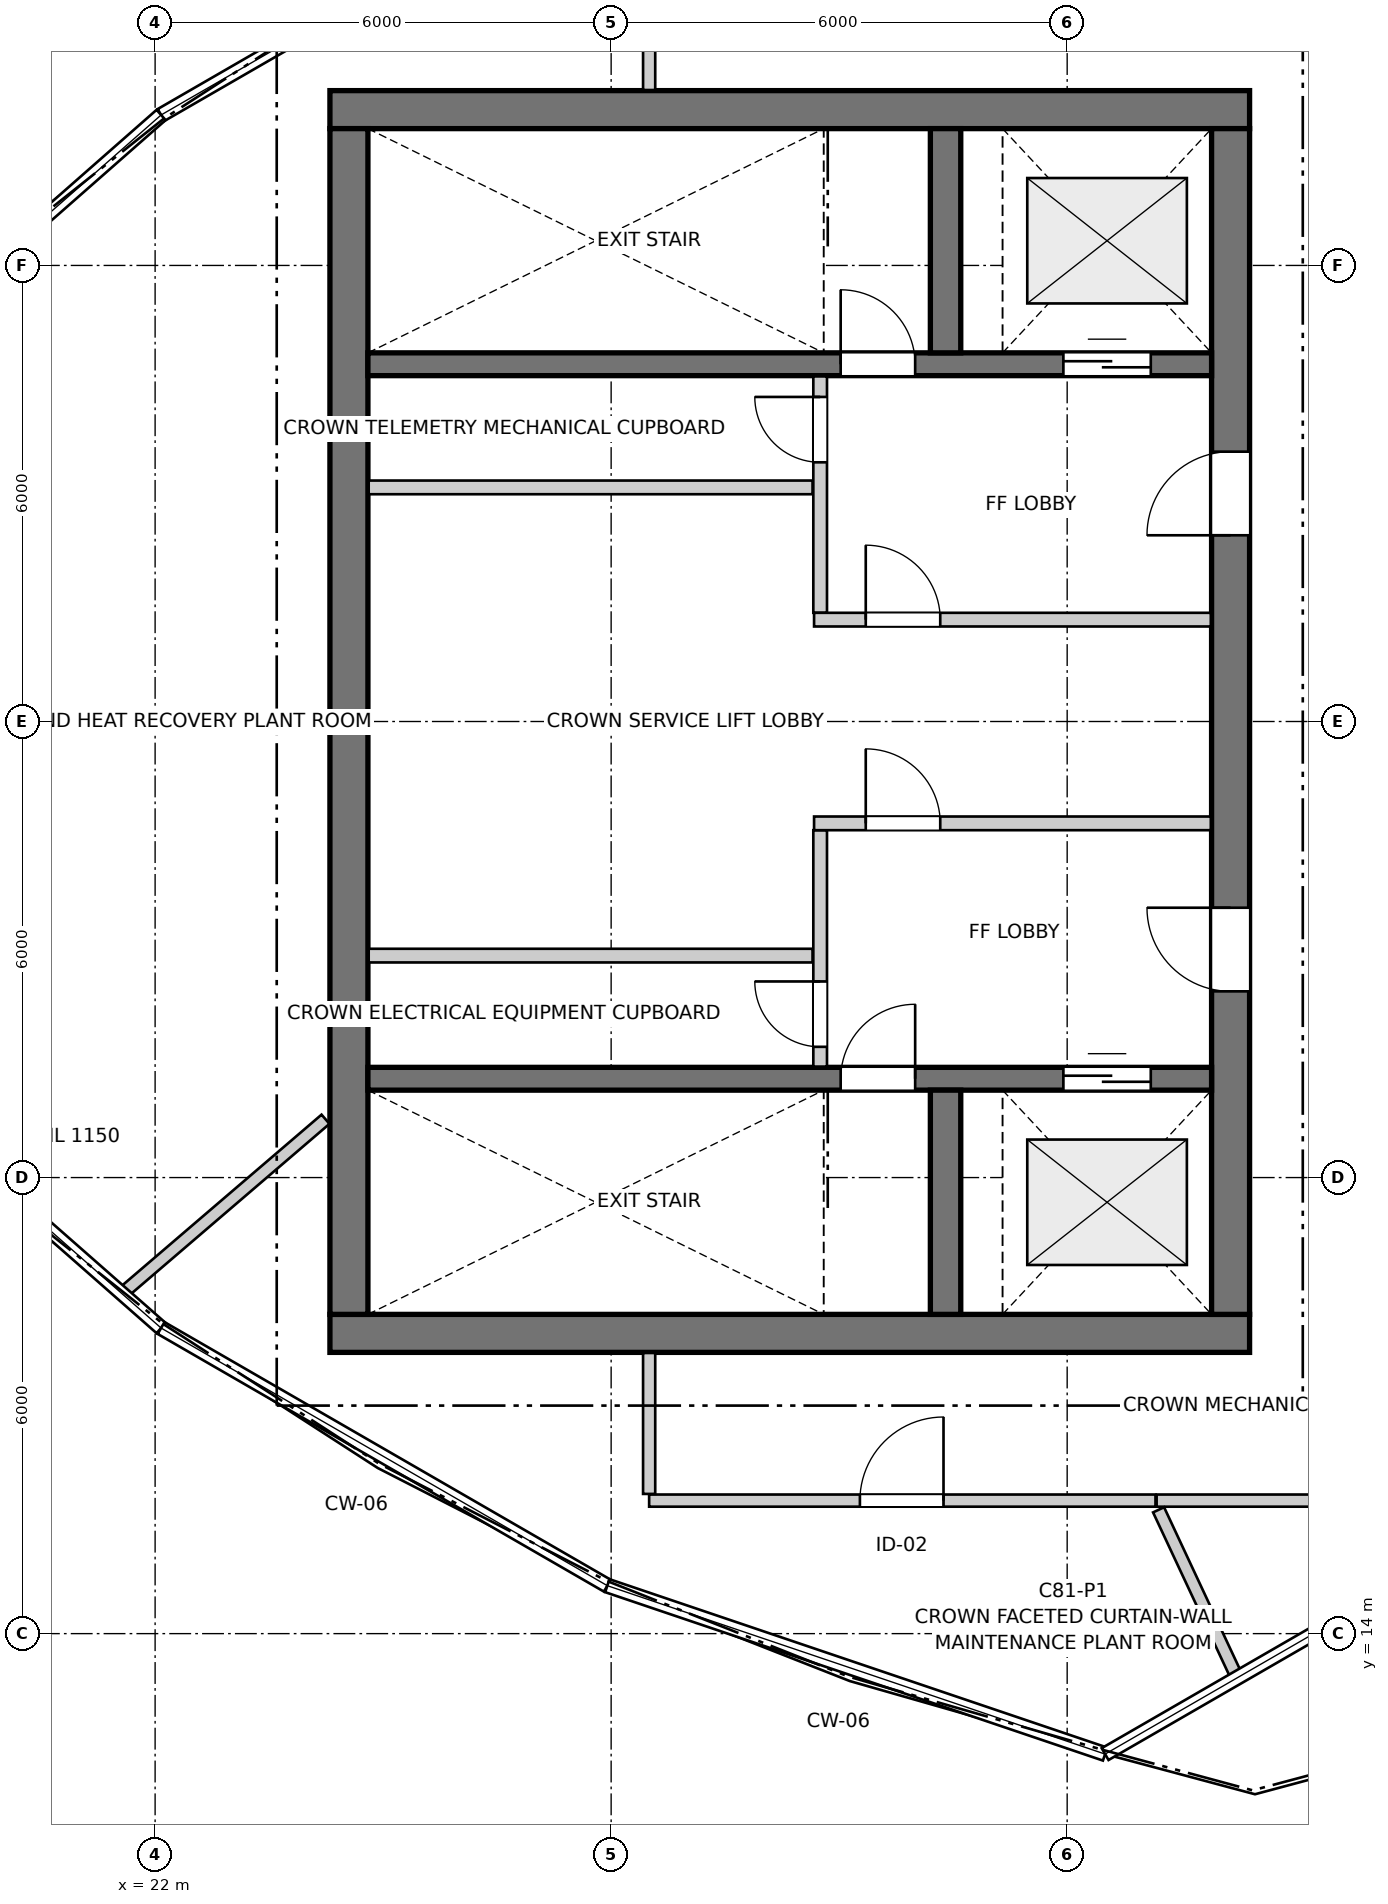
"""IFC4 building model, lengths in metres.
Left out: names, types, materials, properties, quantities, classifications, styles, units other than length and angle.
Written with IfcOpenShell. Run it as: python <this file> out.ifc"""

import sys

from ifc_helpers import new_model, si_unit, direction, frame, frame_2d, origin, place, context, subcontext, project, spatial, rectangle, extrude, source, transform, mapped, element, fill, save


model = new_model("IFC4")
c1 = context("Model", 3, precision=1e-05, world=origin(), true_north=direction((0.0, 1.0)))
c2 = subcontext(c1, "Body", "Model", "MODEL_VIEW")
j1 = project(units=[si_unit("LENGTHUNIT", "METRE"), si_unit("PLANEANGLEUNIT", "RADIAN")], contexts=[c1])
p1 = place(None, origin())
s1 = spatial("IfcSite", under=j1, at=p1, CompositionType="ELEMENT")
p2 = place(p1, origin())
s2 = spatial("IfcBuilding", under=s1, at=p2, CompositionType="ELEMENT")
p3 = place(p2, frame((0.0, 0.0, 274.7)))
s3 = spatial("IfcBuildingStorey", under=s2, at=p3, CompositionType="ELEMENT", Elevation=274.7)
for number, where, z_axis, x_axis in (
    (1, (24.3, 17.95, 0.0), (0.0, 0.0, 1.0), (1.0, 0.0, 0.0)),
    (2, (36.4, 34.05, 0.0), (0.0, 0.0, 1.0), (-1.0, 0.0, 0.0)),
):
    element("IfcWall", number, at=place(p3, frame(where, z_axis=z_axis, x_axis=x_axis)), inside=s3, PredefinedType="SHEAR", context=c2, shape_type="SweptSolid", body=[
        extrude(rectangle(XDim=12.1, YDim=0.5, at=frame_2d((6.05, 0.0))), origin(), (0.0, 0.0, 1.0), 3.062),
    ])
p4 = place(p3, frame((24.55, 33.8, 0.0), z_axis=(0.0, 0.0, 1.0), x_axis=(0.0, -1.0, 0.0)))
e3 = element("IfcWall", 3, at=p4, inside=s3, PredefinedType="SHEAR", context=c2, shape_type="SweptSolid", body=[
    extrude(rectangle(XDim=15.6, YDim=0.5, at=frame_2d((7.8, 0.0))), origin(), (0.0, 0.0, 1.0), 3.062),
])
p5 = place(p3, frame((36.15, 18.2, 0.0), z_axis=(0.0, 0.0, 1.0), x_axis=(0.0, 1.0, 0.0)))
e4 = element("IfcWall", 4, at=p5, inside=s3, PredefinedType="SHEAR", context=c2, shape_type="SweptSolid", body=[
    extrude(rectangle(XDim=15.6, YDim=0.5, at=frame_2d((7.8, 0.0))), origin(), (0.0, 0.0, 1.0), 3.062),
])
p6 = place(p5, frame((4.25, 0.0, 0.0)))
e5 = element("IfcOpeningElement", 5, at=p6, cuts=e4, PredefinedType="OPENING", context=c2, shape_type="SweptSolid", body=[
    extrude(rectangle(XDim=1.1, YDim=2.15, at=frame_2d((0.55, 1.075))), frame((0.0, 0.26, 0.0), z_axis=(0.0, -1.0, 0.0), x_axis=(1.0, 0.0, 0.0)), (0.0, 0.0, 1.0), 0.52),
])
p7 = place(p5, frame((10.25, 0.0, 0.0)))
e6 = element("IfcOpeningElement", 6, at=p7, cuts=e4, PredefinedType="OPENING", context=c2, shape_type="SweptSolid", body=[
    extrude(rectangle(XDim=1.1, YDim=2.15, at=frame_2d((0.55, 1.075))), frame((0.0, 0.26, 0.0), z_axis=(0.0, -1.0, 0.0), x_axis=(1.0, 0.0, 0.0)), (0.0, 0.0, 1.0), 0.52),
])
p8 = place(p3, frame((24.8, 21.3, 0.0), z_axis=(0.0, 0.0, 1.0), x_axis=(1.0, 0.0, 0.0)))
e7 = element("IfcWall", 7, at=p8, inside=s3, PredefinedType="SHEAR", context=c2, shape_type="SweptSolid", body=[
    extrude(rectangle(XDim=11.1, YDim=0.3, at=frame_2d((5.55, 0.0))), origin(), (0.0, 0.0, 1.0), 3.062),
])
p9 = place(p8, frame((6.22, 0.0, 0.0)))
e8 = element("IfcOpeningElement", 8, at=p9, cuts=e7, PredefinedType="OPENING", context=c2, shape_type="SweptSolid", body=[
    extrude(rectangle(XDim=0.98, YDim=2.15, at=frame_2d((0.49, 1.075))), frame((0.0, 0.16, 0.0), z_axis=(0.0, -1.0, 0.0), x_axis=(1.0, 0.0, 0.0)), (0.0, 0.0, 1.0), 0.32),
])
p10 = place(p8, frame((9.15, 0.0, 0.0)))
e9 = element("IfcOpeningElement", 9, at=p10, cuts=e7, PredefinedType="OPENING", context=c2, shape_type="SweptSolid", body=[
    extrude(rectangle(XDim=1.15, YDim=2.15, at=frame_2d((0.575, 1.075))), frame((0.0, 0.16, 0.0), z_axis=(0.0, -1.0, 0.0), x_axis=(1.0, 0.0, 0.0)), (0.0, 0.0, 1.0), 0.32),
])
p11 = place(p3, frame((32.4, 18.2, 0.0), z_axis=(0.0, 0.0, 1.0), x_axis=(0.0, 1.0, 0.0)))
e10 = element("IfcWall", 10, at=p11, inside=s3, PredefinedType="SHEAR", context=c2, shape_type="SweptSolid", body=[
    extrude(rectangle(XDim=2.95, YDim=0.4, at=frame_2d((1.475, 0.0))), origin(), (0.0, 0.0, 1.0), 3.062),
])
p12 = place(p3, frame((24.8, 30.7, 0.0), z_axis=(0.0, 0.0, 1.0), x_axis=(1.0, 0.0, 0.0)))
e11 = element("IfcWall", 11, at=p12, inside=s3, PredefinedType="SHEAR", context=c2, shape_type="SweptSolid", body=[
    extrude(rectangle(XDim=11.1, YDim=0.3, at=frame_2d((5.55, 0.0))), origin(), (0.0, 0.0, 1.0), 3.062),
])
p13 = place(p12, frame((6.22, 0.0, 0.0)))
e12 = element("IfcOpeningElement", 12, at=p13, cuts=e11, PredefinedType="OPENING", context=c2, shape_type="SweptSolid", body=[
    extrude(rectangle(XDim=0.98, YDim=2.15, at=frame_2d((0.49, 1.075))), frame((0.0, 0.16, 0.0), z_axis=(0.0, -1.0, 0.0), x_axis=(1.0, 0.0, 0.0)), (0.0, 0.0, 1.0), 0.32),
])
p14 = place(p12, frame((9.15, 0.0, 0.0)))
e13 = element("IfcOpeningElement", 13, at=p14, cuts=e11, PredefinedType="OPENING", context=c2, shape_type="SweptSolid", body=[
    extrude(rectangle(XDim=1.15, YDim=2.15, at=frame_2d((0.575, 1.075))), frame((0.0, 0.16, 0.0), z_axis=(0.0, -1.0, 0.0), x_axis=(1.0, 0.0, 0.0)), (0.0, 0.0, 1.0), 0.32),
])
p15 = place(p3, frame((32.4, 30.85, 0.0), z_axis=(0.0, 0.0, 1.0), x_axis=(0.0, 1.0, 0.0)))
e14 = element("IfcWall", 14, at=p15, inside=s3, PredefinedType="SHEAR", context=c2, shape_type="SweptSolid", body=[
    extrude(rectangle(XDim=2.95, YDim=0.4, at=frame_2d((1.475, 0.0))), origin(), (0.0, 0.0, 1.0), 3.062),
])
p16 = place(p3, frame((30.75, 21.46, 0.0), z_axis=(0.0, 0.0, 1.0), x_axis=(0.0, 1.0, 0.0)))
e15 = element("IfcWall", 15, at=p16, inside=s3, PredefinedType="PARTITIONING", context=c2, shape_type="SweptSolid", body=[
    extrude(rectangle(XDim=3.11, YDim=0.18, at=frame_2d((1.555, 0.0))), origin(), (0.0, 0.0, 1.0), 2.23),
])
p17 = place(p16, frame((0.26, 0.0, 0.0)))
e16 = element("IfcOpeningElement", 16, at=p17, cuts=e15, PredefinedType="OPENING", context=c2, shape_type="SweptSolid", body=[
    extrude(rectangle(XDim=0.86, YDim=2.05, at=frame_2d((0.43, 1.025))), frame((0.0, 0.1, 0.0), z_axis=(0.0, -1.0, 0.0), x_axis=(1.0, 0.0, 0.0)), (0.0, 0.0, 1.0), 0.2),
])
p18 = place(p3, frame((30.67, 24.66, 0.0), z_axis=(0.0, 0.0, 1.0), x_axis=(1.0, 0.0, 0.0)))
e17 = element("IfcWall", 17, at=p18, inside=s3, PredefinedType="PARTITIONING", context=c2, shape_type="SweptSolid", body=[
    extrude(rectangle(XDim=5.22, YDim=0.18, at=frame_2d((2.61, 0.0))), origin(), (0.0, 0.0, 1.0), 2.23),
])
p19 = place(p18, frame((0.68, 0.0, 0.0)))
e18 = element("IfcOpeningElement", 18, at=p19, cuts=e17, PredefinedType="OPENING", context=c2, shape_type="SweptSolid", body=[
    extrude(rectangle(XDim=0.98, YDim=2.15, at=frame_2d((0.49, 1.075))), frame((0.0, 0.1, 0.0), z_axis=(0.0, -1.0, 0.0), x_axis=(1.0, 0.0, 0.0)), (0.0, 0.0, 1.0), 0.2),
])
p20 = place(p3, frame((30.75, 27.43, 0.0), z_axis=(0.0, 0.0, 1.0), x_axis=(0.0, 1.0, 0.0)))
e19 = element("IfcWall", 19, at=p20, inside=s3, PredefinedType="PARTITIONING", context=c2, shape_type="SweptSolid", body=[
    extrude(rectangle(XDim=3.11, YDim=0.18, at=frame_2d((1.555, 0.0))), origin(), (0.0, 0.0, 1.0), 2.23),
])
p21 = place(p20, frame((1.98, 0.0, 0.0)))
e20 = element("IfcOpeningElement", 20, at=p21, cuts=e19, PredefinedType="OPENING", context=c2, shape_type="SweptSolid", body=[
    extrude(rectangle(XDim=0.86, YDim=2.05, at=frame_2d((0.43, 1.025))), frame((0.0, 0.1, 0.0), z_axis=(0.0, -1.0, 0.0), x_axis=(1.0, 0.0, 0.0)), (0.0, 0.0, 1.0), 0.2),
])
p22 = place(p3, frame((30.67, 27.34, 0.0), z_axis=(0.0, 0.0, 1.0), x_axis=(1.0, 0.0, 0.0)))
e21 = element("IfcWall", 21, at=p22, inside=s3, PredefinedType="PARTITIONING", context=c2, shape_type="SweptSolid", body=[
    extrude(rectangle(XDim=5.22, YDim=0.18, at=frame_2d((2.61, 0.0))), origin(), (0.0, 0.0, 1.0), 2.23),
])
p23 = place(p22, frame((0.68, 0.0, 0.0)))
e22 = element("IfcOpeningElement", 22, at=p23, cuts=e21, PredefinedType="OPENING", context=c2, shape_type="SweptSolid", body=[
    extrude(rectangle(XDim=0.98, YDim=2.15, at=frame_2d((0.49, 1.075))), frame((0.0, 0.1, 0.0), z_axis=(0.0, -1.0, 0.0), x_axis=(1.0, 0.0, 0.0)), (0.0, 0.0, 1.0), 0.2),
])
for number, where, z_axis, x_axis in (
    (23, (24.81, 22.92, 0.0), (0.0, 0.0, 1.0), (1.0, 0.0, 0.0)),
    (24, (24.81, 29.08, 0.0), (0.0, 0.0, 1.0), (1.0, 0.0, 0.0)),
):
    element("IfcWall", number, at=place(p3, frame(where, z_axis=z_axis, x_axis=x_axis)), inside=s3, PredefinedType="PARTITIONING", context=c2, shape_type="SweptSolid", body=[
        extrude(rectangle(XDim=5.84, YDim=0.18, at=frame_2d((2.92, 0.0))), origin(), (0.0, 0.0, 1.0), 2.23),
    ])
p24 = place(p3, frame((28.5, 15.75, 0.0), z_axis=(0.0, 0.0, 1.0), x_axis=(1.0, 0.0, 0.0)))
e25 = element("IfcWall", 25, at=p24, inside=s3, PredefinedType="PARTITIONING", context=c2, shape_type="SweptSolid", body=[
    extrude(rectangle(XDim=6.662, YDim=0.16, at=frame_2d((3.331, 0.0))), origin(), (0.0, 0.0, 1.0), 2.23),
])
p25 = place(p24, frame((2.773, 0.0, 0.0)))
e26 = element("IfcOpeningElement", 26, at=p25, cuts=e25, PredefinedType="OPENING", context=c2, shape_type="SweptSolid", body=[
    extrude(rectangle(XDim=1.1, YDim=2.15, at=frame_2d((0.55, 1.075))), frame((0.0, 0.09, 0.0), z_axis=(0.0, -1.0, 0.0), x_axis=(1.0, 0.0, 0.0)), (0.0, 0.0, 1.0), 0.18),
])
p26 = place(p3, frame((21.585, 18.49, 0.0), z_axis=(0.0, 0.0, 1.0), x_axis=(0.75939941165, 0.650624725619, 0.0)))
e27 = element("IfcWall", 27, at=p26, inside=s3, PredefinedType="PARTITIONING", context=c2, shape_type="SweptSolid", body=[
    extrude(rectangle(XDim=3.499, YDim=0.16, at=frame_2d((1.75, 0.0))), origin(), (0.0, 0.0, 1.0), 2.23),
])
p27 = place(p3, frame((35.177, 15.75, 0.0), z_axis=(0.0, 0.0, 1.0), x_axis=(1.0, 0.0, 0.0)))
e28 = element("IfcWall", 28, at=p27, inside=s3, PredefinedType="PARTITIONING", context=c2, shape_type="SweptSolid", body=[
    extrude(rectangle(XDim=3.385, YDim=0.16, at=frame_2d((1.692, 0.0))), origin(), (0.0, 0.0, 1.0), 2.23),
])
p28 = place(p3, frame((35.203, 15.629, 0.0), z_axis=(0.0, 0.0, 1.0), x_axis=(0.423632901081, -0.905833961122, 0.0)))
e29 = element("IfcWall", 29, at=p28, inside=s3, PredefinedType="PARTITIONING", context=c2, shape_type="SweptSolid", body=[
    extrude(rectangle(XDim=2.414, YDim=0.16, at=frame_2d((1.207, 0.0))), origin(), (0.0, 0.0, 1.0), 2.23),
])
for number, where, z_axis, x_axis in (
    (30, (28.5, 34.308, 0.0), (0.0, 0.0, 1.0), (0.0, 1.0, 0.0)),
    (31, (28.5, 15.838, 0.0), (0.0, 0.0, 1.0), (0.0, 1.0, 0.0)),
):
    element("IfcWall", number, at=place(p3, frame(where, z_axis=z_axis, x_axis=x_axis)), inside=s3, PredefinedType="PARTITIONING", context=c2, shape_type="SweptSolid", body=[
        extrude(rectangle(XDim=1.854, YDim=0.16, at=frame_2d((0.927, 0.0))), origin(), (0.0, 0.0, 1.0), 2.23),
    ])
m1 = source(origin(), c2, "Body", "SweptSolid", [
    extrude(rectangle(XDim=0.98, YDim=2.15, at=frame_2d((0.49, 1.075))), frame((0.0, 0.025, 0.0), z_axis=(0.0, -1.0, 0.0), x_axis=(1.0, 0.0, 0.0)), (0.0, 0.0, 1.0), 0.05),
])
p29 = place(p9, origin())
e32 = element("IfcDoor", 32, at=p29, inside=s3, OperationType="SINGLE_SWING_RIGHT", PredefinedType="DOOR", context=c2, shape_type="MappedRepresentation", body=[
    mapped(m1, transform((0.0, 0.0, 0.0), x_axis=(1.0, 0.0, 0.0), y_axis=(0.0, 1.0, 0.0), z_axis=(0.0, 0.0, 1.0), scale=1.0)),
])
fill(e8, e32)
m2 = source(origin(), c2, "Body", "SweptSolid", [
    extrude(rectangle(XDim=1.15, YDim=2.15, at=frame_2d((0.575, 1.075))), frame((0.0, 0.025, 0.0), z_axis=(0.0, -1.0, 0.0), x_axis=(1.0, 0.0, 0.0)), (0.0, 0.0, 1.0), 0.05),
])
p30 = place(p10, origin())
e33 = element("IfcDoor", 33, at=p30, inside=s3, OperationType="DOUBLE_DOOR_SLIDING", PredefinedType="DOOR", context=c2, shape_type="MappedRepresentation", body=[
    mapped(m2, transform((0.0, 0.0, 0.0), x_axis=(1.0, 0.0, 0.0), y_axis=(0.0, 1.0, 0.0), z_axis=(0.0, 0.0, 1.0), scale=1.0)),
])
fill(e9, e33)
p31 = place(p13, origin())
e34 = element("IfcDoor", 34, at=p31, inside=s3, OperationType="SINGLE_SWING_LEFT", PredefinedType="DOOR", context=c2, shape_type="MappedRepresentation", body=[
    mapped(m1, transform((0.0, 0.0, 0.0), x_axis=(1.0, 0.0, 0.0), y_axis=(0.0, 1.0, 0.0), z_axis=(0.0, 0.0, 1.0), scale=1.0)),
])
fill(e12, e34)
p32 = place(p14, origin())
e35 = element("IfcDoor", 35, at=p32, inside=s3, OperationType="DOUBLE_DOOR_SLIDING", PredefinedType="DOOR", context=c2, shape_type="MappedRepresentation", body=[
    mapped(m2, transform((0.0, 0.0, 0.0), x_axis=(1.0, 0.0, 0.0), y_axis=(0.0, 1.0, 0.0), z_axis=(0.0, 0.0, 1.0), scale=1.0)),
])
fill(e13, e35)
m3 = source(origin(), c2, "Body", "SweptSolid", [
    extrude(rectangle(XDim=1.1, YDim=2.15, at=frame_2d((0.55, 1.075))), frame((0.0, 0.025, 0.0), z_axis=(0.0, -1.0, 0.0), x_axis=(1.0, 0.0, 0.0)), (0.0, 0.0, 1.0), 0.05),
])
p33 = place(p6, origin())
e36 = element("IfcDoor", 36, at=p33, inside=s3, OperationType="SINGLE_SWING_RIGHT", PredefinedType="DOOR", context=c2, shape_type="MappedRepresentation", body=[
    mapped(m3, transform((0.0, 0.0, 0.0), x_axis=(1.0, 0.0, 0.0), y_axis=(0.0, 1.0, 0.0), z_axis=(0.0, 0.0, 1.0), scale=1.0)),
])
fill(e5, e36)
p34 = place(p7, origin())
e37 = element("IfcDoor", 37, at=p34, inside=s3, OperationType="SINGLE_SWING_LEFT", PredefinedType="DOOR", context=c2, shape_type="MappedRepresentation", body=[
    mapped(m3, transform((0.0, 0.0, 0.0), x_axis=(1.0, 0.0, 0.0), y_axis=(0.0, 1.0, 0.0), z_axis=(0.0, 0.0, 1.0), scale=1.0)),
])
fill(e6, e37)
m4 = source(origin(), c2, "Body", "SweptSolid", [
    extrude(rectangle(XDim=0.86, YDim=2.05, at=frame_2d((0.43, 1.025))), frame((0.0, 0.025, 0.0), z_axis=(0.0, -1.0, 0.0), x_axis=(1.0, 0.0, 0.0)), (0.0, 0.0, 1.0), 0.05),
])
p35 = place(p17, origin())
e38 = element("IfcDoor", 38, at=p35, inside=s3, OperationType="SINGLE_SWING_RIGHT", PredefinedType="DOOR", context=c2, shape_type="MappedRepresentation", body=[
    mapped(m4, transform((0.0, 0.0, 0.0), x_axis=(1.0, 0.0, 0.0), y_axis=(0.0, 1.0, 0.0), z_axis=(0.0, 0.0, 1.0), scale=1.0)),
])
fill(e16, e38)
p36 = place(p19, origin())
e39 = element("IfcDoor", 39, at=p36, inside=s3, OperationType="SINGLE_SWING_LEFT", PredefinedType="DOOR", context=c2, shape_type="MappedRepresentation", body=[
    mapped(m1, transform((0.0, 0.0, 0.0), x_axis=(1.0, 0.0, 0.0), y_axis=(0.0, 1.0, 0.0), z_axis=(0.0, 0.0, 1.0), scale=1.0)),
])
fill(e18, e39)
p37 = place(p21, origin())
e40 = element("IfcDoor", 40, at=p37, inside=s3, OperationType="SINGLE_SWING_RIGHT", PredefinedType="DOOR", context=c2, shape_type="MappedRepresentation", body=[
    mapped(m4, transform((0.0, 0.0, 0.0), x_axis=(1.0, 0.0, 0.0), y_axis=(0.0, 1.0, 0.0), z_axis=(0.0, 0.0, 1.0), scale=1.0)),
])
fill(e20, e40)
p38 = place(p23, origin())
e41 = element("IfcDoor", 41, at=p38, inside=s3, OperationType="SINGLE_SWING_LEFT", PredefinedType="DOOR", context=c2, shape_type="MappedRepresentation", body=[
    mapped(m1, transform((0.0, 0.0, 0.0), x_axis=(1.0, 0.0, 0.0), y_axis=(0.0, 1.0, 0.0), z_axis=(0.0, 0.0, 1.0), scale=1.0)),
])
fill(e22, e41)
p39 = place(p25, origin())
e42 = element("IfcDoor", 42, at=p39, inside=s3, OperationType="SINGLE_SWING_RIGHT", PredefinedType="DOOR", context=c2, shape_type="MappedRepresentation", body=[
    mapped(m3, transform((0.0, 0.0, 0.0), x_axis=(1.0, 0.0, 0.0), y_axis=(0.0, 1.0, 0.0), z_axis=(0.0, 0.0, 1.0), scale=1.0)),
])
fill(e26, e42)
save(model, sys.argv[1])
